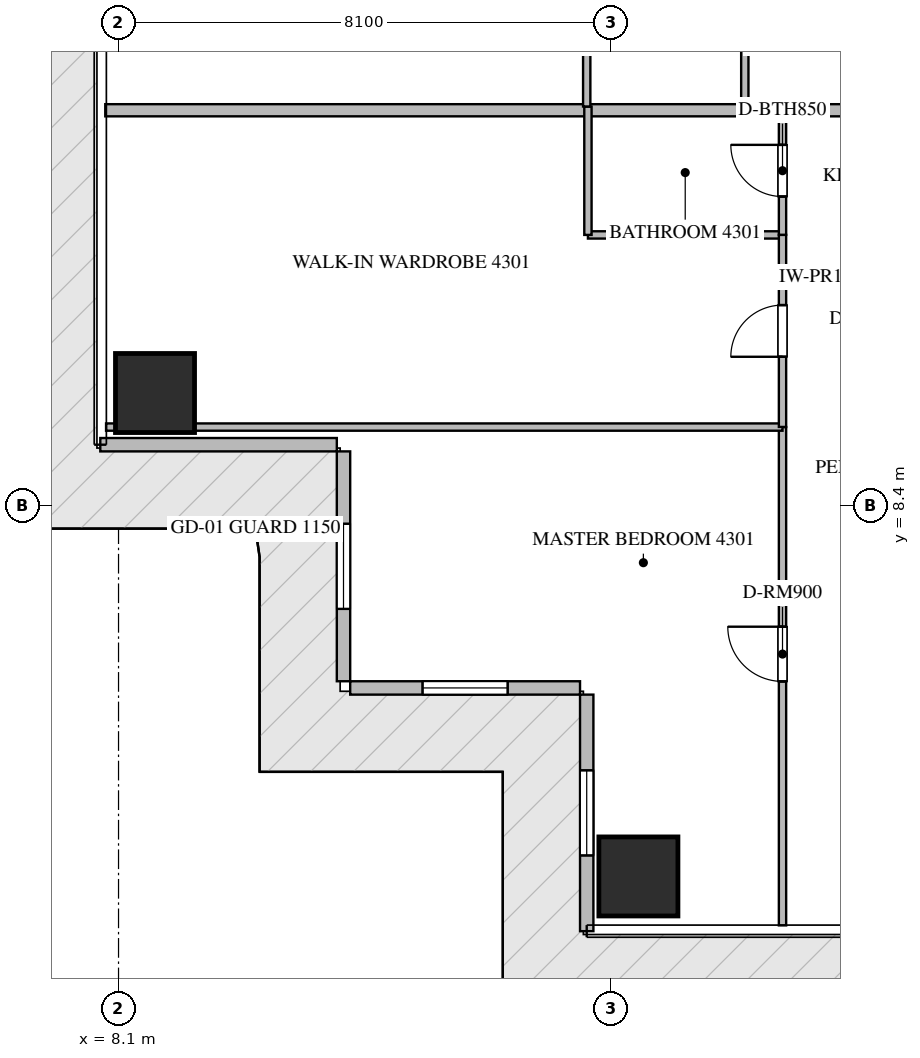
"""IFC4 building model, lengths in metres.
Left out: names, types, materials, properties, quantities, classifications, styles, units other than length and angle.
Written with IfcOpenShell. Run it as: python <this file> out.ifc"""

import sys

from ifc_helpers import new_model, si_unit, direction, frame, frame_2d, origin, origin_2d, place, context, subcontext, project, spatial, rectangle, extrude, source, transform, mapped, element, fill, save


model = new_model("IFC4")
c1 = context("Model", 3, precision=1e-05, world=origin(), true_north=direction((0.0, 1.0)))
c2 = subcontext(c1, "Body", "Model", "MODEL_VIEW")
j1 = project(units=[si_unit("LENGTHUNIT", "METRE"), si_unit("PLANEANGLEUNIT", "RADIAN")], contexts=[c1])
p1 = place(None, origin())
s1 = spatial("IfcSite", under=j1, at=p1, CompositionType="ELEMENT")
p2 = place(p1, origin())
s2 = spatial("IfcBuilding", under=s1, at=p2, CompositionType="ELEMENT")
p3 = place(p2, frame((0.0, 0.0, 172.65)))
s3 = spatial("IfcBuildingStorey", under=s2, at=p3, CompositionType="ELEMENT", Elevation=172.65)
m1 = source(origin(), c2, "Body", "SweptSolid", [
    extrude(rectangle(XDim=1.3, YDim=1.3, at=origin_2d()), origin(), (0.0, 0.0, 1.0), 3.75),
])
for number, where, z_axis, x_axis in (
    (1, (16.65, 2.3, -0.26), (0.0, 0.0, 1.0), (1.0, 0.0, 0.0)),
    (2, (8.7, 10.25, -0.26), (0.0, 0.0, 1.0), (1.0, 0.0, 0.0)),
):
    element("IfcColumn", number, at=place(p3, frame(where, z_axis=z_axis, x_axis=x_axis)), inside=s3, PredefinedType="COLUMN", context=c2, shape_type="MappedRepresentation", body=[
        mapped(m1, transform((0.0, 0.0, 0.0), scale=1.0)),
    ])
p4 = place(p3, frame((7.8, 9.4, 0.0), z_axis=(0.0, 0.0, 1.0), x_axis=(1.0, 0.0, 0.0)))
e3 = element("IfcWall", 3, at=p4, inside=s3, PredefinedType="ELEMENTEDWALL", context=c2, shape_type="SweptSolid", body=[
    extrude(rectangle(XDim=3.89, YDim=0.22, at=frame_2d((1.945, 0.0))), origin(), (0.0, 0.0, 1.0), 3.475),
])
p5 = place(p3, frame((11.8, 9.29, 0.0), z_axis=(0.0, 0.0, 1.0), x_axis=(0.0, -1.0, 0.0)))
e4 = element("IfcWall", 4, at=p5, inside=s3, PredefinedType="ELEMENTEDWALL", context=c2, shape_type="SweptSolid", body=[
    extrude(rectangle(XDim=3.78, YDim=0.22, at=frame_2d((1.89, 0.0))), origin(), (0.0, 0.0, 1.0), 3.475),
])
p6 = place(p5, frame((1.19, 0.0, 0.65)))
e5 = element("IfcOpeningElement", 5, at=p6, cuts=e4, PredefinedType="OPENING", context=c2, shape_type="SweptSolid", body=[
    extrude(rectangle(XDim=1.4, YDim=2.05, at=frame_2d((0.7, 1.025))), frame((0.0, 0.12, 0.0), z_axis=(0.0, -1.0, 0.0), x_axis=(1.0, 0.0, 0.0)), (0.0, 0.0, 1.0), 0.24),
])
p7 = place(p3, frame((11.91, 5.4, 0.0), z_axis=(0.0, 0.0, 1.0), x_axis=(1.0, 0.0, 0.0)))
e6 = element("IfcWall", 6, at=p7, inside=s3, PredefinedType="ELEMENTEDWALL", context=c2, shape_type="SweptSolid", body=[
    extrude(rectangle(XDim=3.78, YDim=0.22, at=frame_2d((1.89, 0.0))), origin(), (0.0, 0.0, 1.0), 3.475),
])
p8 = place(p7, frame((1.19, 0.0, 0.65)))
e7 = element("IfcOpeningElement", 7, at=p8, cuts=e6, PredefinedType="OPENING", context=c2, shape_type="SweptSolid", body=[
    extrude(rectangle(XDim=1.4, YDim=2.05, at=frame_2d((0.7, 1.025))), frame((0.0, 0.12, 0.0), z_axis=(0.0, -1.0, 0.0), x_axis=(1.0, 0.0, 0.0)), (0.0, 0.0, 1.0), 0.24),
])
p9 = place(p3, frame((15.8, 5.29, 0.0), z_axis=(0.0, 0.0, 1.0), x_axis=(0.0, -1.0, 0.0)))
e8 = element("IfcWall", 8, at=p9, inside=s3, PredefinedType="ELEMENTEDWALL", context=c2, shape_type="SweptSolid", body=[
    extrude(rectangle(XDim=3.89, YDim=0.22, at=frame_2d((1.945, 0.0))), origin(), (0.0, 0.0, 1.0), 3.475),
])
p10 = place(p9, frame((1.245, 0.0, 0.65)))
e9 = element("IfcOpeningElement", 9, at=p10, cuts=e8, PredefinedType="OPENING", context=c2, shape_type="SweptSolid", body=[
    extrude(rectangle(XDim=1.4, YDim=2.05, at=frame_2d((0.7, 1.025))), frame((0.0, 0.12, 0.0), z_axis=(0.0, -1.0, 0.0), x_axis=(1.0, 0.0, 0.0)), (0.0, 0.0, 1.0), 0.24),
])
p11 = place(p3, frame((7.882, 14.9, 0.0), z_axis=(0.0, 0.0, 1.0), x_axis=(1.0, 0.0, 0.0)))
e10 = element("IfcWall", 10, at=p11, inside=s3, PredefinedType="PARTITIONING", context=c2, shape_type="SweptSolid", body=[
    extrude(rectangle(XDim=13.068, YDim=0.2, at=frame_2d((6.534, 0.0))), origin(), (0.0, 0.0, 1.0), 3.49),
])
p12 = place(p3, frame((19.02, 12.15, 0.0), z_axis=(0.0, 0.0, 1.0), x_axis=(1.0, 0.0, 0.0)))
e11 = element("IfcWall", 11, at=p12, inside=s3, PredefinedType="PARTITIONING", context=c2, shape_type="SweptSolid", body=[
    extrude(rectangle(XDim=2.85, YDim=0.12, at=frame_2d((1.425, 0.0))), origin(), (0.0, 0.0, 1.0), 3.49),
])
p13 = place(p12, frame((1.0, 0.0, 0.0)))
e12 = element("IfcOpeningElement", 12, at=p13, cuts=e11, PredefinedType="OPENING", context=c2, shape_type="SweptSolid", body=[
    extrude(rectangle(XDim=0.85, YDim=2.1, at=frame_2d((0.425, 1.05))), frame((0.0, 0.07, 0.0), z_axis=(0.0, -1.0, 0.0), x_axis=(1.0, 0.0, 0.0)), (0.0, 0.0, 1.0), 0.14),
])
p14 = place(p3, frame((19.02, 1.495, 0.0), z_axis=(0.0, 0.0, 1.0), x_axis=(0.0, 1.0, 0.0)))
e13 = element("IfcWall", 13, at=p14, inside=s3, PredefinedType="PARTITIONING", context=c2, shape_type="SweptSolid", body=[
    extrude(rectangle(XDim=8.195, YDim=0.12, at=frame_2d((4.097, 0.0))), origin(), (0.0, 0.0, 1.0), 3.49),
])
p15 = place(p14, frame((4.012, 0.0, 0.0)))
e14 = element("IfcOpeningElement", 14, at=p15, cuts=e13, PredefinedType="OPENING", context=c2, shape_type="SweptSolid", body=[
    extrude(rectangle(XDim=0.9, YDim=2.1, at=frame_2d((0.45, 1.05))), frame((0.0, 0.07, 0.0), z_axis=(0.0, -1.0, 0.0), x_axis=(1.0, 0.0, 0.0)), (0.0, 0.0, 1.0), 0.14),
])
p16 = place(p3, frame((7.895, 9.69, 0.0), z_axis=(0.0, 0.0, 1.0), x_axis=(1.0, 0.0, 0.0)))
e15 = element("IfcWall", 15, at=p16, inside=s3, PredefinedType="PARTITIONING", context=c2, shape_type="SweptSolid", body=[
    extrude(rectangle(XDim=11.125, YDim=0.12, at=frame_2d((5.562, 0.0))), origin(), (0.0, 0.0, 1.0), 3.49),
])
p17 = place(p3, frame((15.82, 12.85, 0.0), z_axis=(0.0, 0.0, 1.0), x_axis=(1.0, 0.0, 0.0)))
e16 = element("IfcWall", 16, at=p17, inside=s3, PredefinedType="PARTITIONING", context=c2, shape_type="SweptSolid", body=[
    extrude(rectangle(XDim=3.2, YDim=0.12, at=frame_2d((1.6, 0.0))), origin(), (0.0, 0.0, 1.0), 3.49),
])
p18 = place(p3, frame((15.82, 12.85, 0.0), z_axis=(0.0, 0.0, 1.0), x_axis=(0.0, 1.0, 0.0)))
e17 = element("IfcWall", 17, at=p18, inside=s3, PredefinedType="PARTITIONING", context=c2, shape_type="SweptSolid", body=[
    extrude(rectangle(XDim=2.11, YDim=0.12, at=frame_2d((1.055, 0.0))), origin(), (0.0, 0.0, 1.0), 3.49),
])
p19 = place(p3, frame((19.02, 9.692, 0.0), z_axis=(0.0, 0.0, 1.0), x_axis=(0.0, 1.0, 0.0)))
e18 = element("IfcWall", 18, at=p19, inside=s3, PredefinedType="PARTITIONING", context=c2, shape_type="SweptSolid", body=[
    extrude(rectangle(XDim=3.158, YDim=0.12, at=frame_2d((1.579, 0.0))), origin(), (0.0, 0.0, 1.0), 3.49),
])
p20 = place(p19, frame((1.154, 0.0, 0.0)))
e19 = element("IfcOpeningElement", 19, at=p20, cuts=e18, PredefinedType="OPENING", context=c2, shape_type="SweptSolid", body=[
    extrude(rectangle(XDim=0.85, YDim=2.1, at=frame_2d((0.425, 1.05))), frame((0.0, 0.07, 0.0), z_axis=(0.0, -1.0, 0.0), x_axis=(1.0, 0.0, 0.0)), (0.0, 0.0, 1.0), 0.14),
])
p21 = place(p3, frame((19.02, 12.852, 0.0), z_axis=(0.0, 0.0, 1.0), x_axis=(0.0, 1.0, 0.0)))
e20 = element("IfcWall", 20, at=p21, inside=s3, PredefinedType="PARTITIONING", context=c2, shape_type="SweptSolid", body=[
    extrude(rectangle(XDim=2.108, YDim=0.12, at=frame_2d((1.054, 0.0))), origin(), (0.0, 0.0, 1.0), 3.49),
])
p22 = place(p21, frame((0.629, 0.0, 0.0)))
e21 = element("IfcOpeningElement", 21, at=p22, cuts=e20, PredefinedType="OPENING", context=c2, shape_type="SweptSolid", body=[
    extrude(rectangle(XDim=0.85, YDim=2.1, at=frame_2d((0.425, 1.05))), frame((0.0, 0.07, 0.0), z_axis=(0.0, -1.0, 0.0), x_axis=(1.0, 0.0, 0.0)), (0.0, 0.0, 1.0), 0.14),
])
p23 = place(p3, frame((18.4, 14.84, 0.0), z_axis=(0.0, 0.0, 1.0), x_axis=(0.0, 1.0, 0.0)))
e22 = element("IfcWall", 22, at=p23, inside=s3, PredefinedType="PARTITIONING", context=c2, shape_type="SweptSolid", body=[
    extrude(rectangle(XDim=2.81, YDim=0.12, at=frame_2d((1.405, 0.0))), origin(), (0.0, 0.0, 1.0), 3.49),
])
p24 = place(p3, frame((15.8, 14.962, 0.0), z_axis=(0.0, 0.0, 1.0), x_axis=(0.0, 1.0, 0.0)))
e23 = element("IfcWall", 23, at=p24, inside=s3, PredefinedType="PARTITIONING", context=c2, shape_type="SweptSolid", body=[
    extrude(rectangle(XDim=2.688, YDim=0.12, at=frame_2d((1.344, 0.0))), origin(), (0.0, 0.0, 1.0), 3.49),
])
m2 = source(origin(), c2, "Body", "SweptSolid", [
    extrude(rectangle(XDim=1.4, YDim=2.05, at=frame_2d((0.7, 1.025))), frame((0.0, 0.03, 0.0), z_axis=(0.0, -1.0, 0.0), x_axis=(1.0, 0.0, 0.0)), (0.0, 0.0, 1.0), 0.06),
])
p25 = place(p6, origin())
e24 = element("IfcWindow", 24, at=p25, inside=s3, PartitioningType="SINGLE_PANEL", PredefinedType="WINDOW", context=c2, shape_type="MappedRepresentation", body=[
    mapped(m2, transform((0.0, 0.0, 0.0), scale=1.0)),
])
fill(e5, e24)
p26 = place(p8, origin())
e25 = element("IfcWindow", 25, at=p26, inside=s3, PartitioningType="SINGLE_PANEL", PredefinedType="WINDOW", context=c2, shape_type="MappedRepresentation", body=[
    mapped(m2, transform((0.0, 0.0, 0.0), scale=1.0)),
])
fill(e7, e25)
p27 = place(p10, origin())
e26 = element("IfcWindow", 26, at=p27, inside=s3, PartitioningType="SINGLE_PANEL", PredefinedType="WINDOW", context=c2, shape_type="MappedRepresentation", body=[
    mapped(m2, transform((0.0, 0.0, 0.0), scale=1.0)),
])
fill(e9, e26)
m3 = source(origin(), c2, "Body", "SweptSolid", [
    extrude(rectangle(XDim=0.9, YDim=2.1, at=frame_2d((0.45, 1.05))), frame((0.0, 0.025, 0.0), z_axis=(0.0, -1.0, 0.0), x_axis=(1.0, 0.0, 0.0)), (0.0, 0.0, 1.0), 0.05),
])
p28 = place(p15, origin())
e27 = element("IfcDoor", 27, at=p28, inside=s3, OperationType="SINGLE_SWING_RIGHT", PredefinedType="DOOR", context=c2, shape_type="MappedRepresentation", body=[
    mapped(m3, transform((0.0, 0.0, 0.0), scale=1.0)),
])
fill(e14, e27)
m4 = source(origin(), c2, "Body", "SweptSolid", [
    extrude(rectangle(XDim=0.85, YDim=2.1, at=frame_2d((0.425, 1.05))), frame((0.0, 0.025, 0.0), z_axis=(0.0, -1.0, 0.0), x_axis=(1.0, 0.0, 0.0)), (0.0, 0.0, 1.0), 0.05),
])
p29 = place(p20, origin())
e28 = element("IfcDoor", 28, at=p29, inside=s3, OperationType="SINGLE_SWING_LEFT", PredefinedType="DOOR", context=c2, shape_type="MappedRepresentation", body=[
    mapped(m4, transform((0.0, 0.0, 0.0), scale=1.0)),
])
fill(e19, e28)
p30 = place(p22, origin())
e29 = element("IfcDoor", 29, at=p30, inside=s3, OperationType="SINGLE_SWING_RIGHT", PredefinedType="DOOR", context=c2, shape_type="MappedRepresentation", body=[
    mapped(m4, transform((0.0, 0.0, 0.0), scale=1.0)),
])
fill(e21, e29)
save(model, sys.argv[1])
